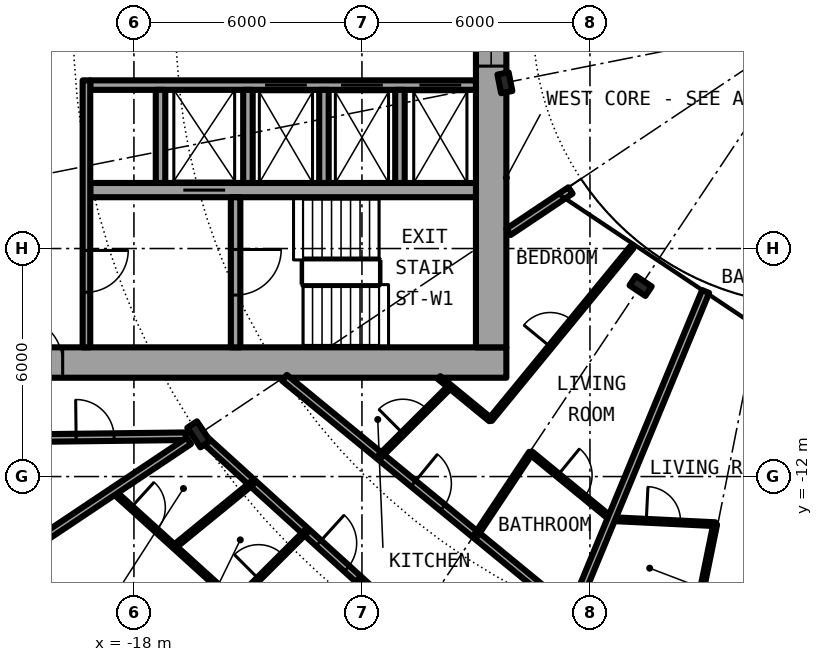
"""IFC4 building model, lengths in metres.
Left out: names, types, materials, properties, quantities, classifications, styles, units other than length and angle.
Written with IfcOpenShell. Run it as: python <this file> out.ifc"""

import sys

from ifc_helpers import new_model, si_unit, direction, frame, frame_2d, origin, origin_2d, place, context, subcontext, project, spatial, rectangle, i_section, extrude, element, fill, save


model = new_model("IFC4")
c1 = context("Model", 3, precision=1e-05, world=origin(), true_north=direction((0.0, 1.0)))
c2 = subcontext(c1, "Body", "Model", "MODEL_VIEW")
j1 = project(units=[si_unit("LENGTHUNIT", "METRE"), si_unit("PLANEANGLEUNIT", "RADIAN")], contexts=[c1])
p1 = place(None, origin())
s1 = spatial("IfcSite", under=j1, at=p1, CompositionType="ELEMENT")
p2 = place(p1, origin())
s2 = spatial("IfcBuilding", under=s1, at=p2, CompositionType="ELEMENT")
p3 = place(p2, frame((0.0, 0.0, 41.1)))
s3 = spatial("IfcBuildingStorey", under=s2, at=p3, CompositionType="ELEMENT", Elevation=41.1)
p4 = place(p3, frame((-16.297, -10.889, 0.0), z_axis=(0.0, 0.0, 1.0), x_axis=(-0.831469612303, -0.55557023302, 0.0)))
e1 = element("IfcColumn", 1, at=p4, inside=s3, PredefinedType="COLUMN", context=c2, shape_type="SweptSolid", body=[
    extrude(i_section(OverallWidth=0.305, OverallDepth=0.62, WebThickness=0.021, FlangeThickness=0.04, FilletRadius=0.027, at=origin_2d()), origin(), (0.0, 0.0, 1.0), 3.05),
])
for number, where, z_axis, x_axis in (
    (2, (-8.239, -1.639, 0.0), (0.0, 0.0, 1.0), (-0.981, -0.195, 0.0)),
    (3, (-4.667, -6.984, 0.0), (0.0, 0.0, 1.0), (-0.556, -0.831, 0.0)),
):
    element("IfcColumn", number, at=place(p3, frame(where, z_axis=z_axis, x_axis=x_axis)), inside=s3, PredefinedType="COLUMN", context=c2, shape_type="SweptSolid", body=[
        extrude(i_section(OverallWidth=0.3, OverallDepth=0.5, WebThickness=0.014, FlangeThickness=0.028, FilletRadius=0.027, at=origin_2d()), origin(), (0.0, 0.0, 1.0), 3.05),
    ])
p5 = place(p3, frame((-22.4, -9.0, 0.0), z_axis=(0.0, 0.0, 1.0), x_axis=(1.0, 0.0, 0.0)))
e4 = element("IfcWall", 4, at=p5, inside=s3, PredefinedType="SHEAR", context=c2, shape_type="SweptSolid", body=[
    extrude(rectangle(XDim=14.2, YDim=0.8, at=frame_2d((7.1, 0.0))), origin(), (0.0, 0.0, 1.0), 3.05),
])
p6 = place(p5, frame((1.325, 0.0, 0.0)))
e5 = element("IfcOpeningElement", 5, at=p6, cuts=e4, PredefinedType="OPENING", context=c2, shape_type="SweptSolid", body=[
    extrude(rectangle(XDim=1.2, YDim=2.3, at=frame_2d((0.6, 1.15))), frame((0.0, 0.41, 0.0), z_axis=(0.0, -1.0, 0.0), x_axis=(1.0, 0.0, 0.0)), (0.0, 0.0, 1.0), 0.82),
])
p7 = place(p3, frame((-8.6, 8.6, 0.0), z_axis=(0.0, 0.0, 1.0), x_axis=(0.0, -1.0, 0.0)))
e6 = element("IfcWall", 6, at=p7, inside=s3, PredefinedType="SHEAR", context=c2, shape_type="SweptSolid", body=[
    extrude(rectangle(XDim=17.2, YDim=0.8, at=frame_2d((8.6, 0.0))), origin(), (0.0, 0.0, 1.0), 3.05),
])
p8 = place(p7, frame((7.4, 0.0, 0.1)))
e7 = element("IfcOpeningElement", 7, at=p8, cuts=e6, PredefinedType="OPENING", context=c2, shape_type="SweptSolid", body=[
    extrude(rectangle(XDim=2.4, YDim=2.2, at=frame_2d((1.2, 1.1))), frame((0.0, 0.41, 0.0), z_axis=(0.0, -1.0, 0.0), x_axis=(1.0, 0.0, 0.0)), (0.0, 0.0, 1.0), 0.82),
])
p9 = place(p3, frame((-9.0, -1.7, 0.0), z_axis=(0.0, 0.0, 1.0), x_axis=(-1.0, 0.0, 0.0)))
e8 = element("IfcWall", 8, at=p9, inside=s3, PredefinedType="SHEAR", context=c2, shape_type="SweptSolid", body=[
    extrude(rectangle(XDim=10.15, YDim=0.25, at=frame_2d((5.075, 0.0))), origin(), (0.0, 0.0, 1.0), 3.05),
])
p10 = place(p9, frame((0.387, 0.0, 0.0)))
e9 = element("IfcOpeningElement", 9, at=p10, cuts=e8, PredefinedType="OPENING", context=c2, shape_type="SweptSolid", body=[
    extrude(rectangle(XDim=1.1, YDim=2.3, at=frame_2d((0.55, 1.15))), frame((0.0, 0.135, 0.0), z_axis=(0.0, -1.0, 0.0), x_axis=(1.0, 0.0, 0.0)), (0.0, 0.0, 1.0), 0.27),
])
p11 = place(p9, frame((2.45, 0.0, 0.0)))
e10 = element("IfcOpeningElement", 10, at=p11, cuts=e8, PredefinedType="OPENING", context=c2, shape_type="SweptSolid", body=[
    extrude(rectangle(XDim=1.1, YDim=2.3, at=frame_2d((0.55, 1.15))), frame((0.0, 0.135, 0.0), z_axis=(0.0, -1.0, 0.0), x_axis=(1.0, 0.0, 0.0)), (0.0, 0.0, 1.0), 0.27),
])
p12 = place(p9, frame((4.45, 0.0, 0.0)))
e11 = element("IfcOpeningElement", 11, at=p12, cuts=e8, PredefinedType="OPENING", context=c2, shape_type="SweptSolid", body=[
    extrude(rectangle(XDim=1.1, YDim=2.3, at=frame_2d((0.55, 1.15))), frame((0.0, 0.135, 0.0), z_axis=(0.0, -1.0, 0.0), x_axis=(1.0, 0.0, 0.0)), (0.0, 0.0, 1.0), 0.27),
])
p13 = place(p3, frame((-9.0, -4.462, 0.0), z_axis=(0.0, 0.0, 1.0), x_axis=(-1.0, 0.0, 0.0)))
e12 = element("IfcWall", 12, at=p13, inside=s3, PredefinedType="SHEAR", context=c2, shape_type="SweptSolid", body=[
    extrude(rectangle(XDim=10.15, YDim=0.375, at=frame_2d((5.075, 0.0))), origin(), (0.0, 0.0, 1.0), 3.05),
])
p14 = place(p13, frame((6.6, 0.0, 0.0)))
e13 = element("IfcOpeningElement", 13, at=p14, cuts=e12, PredefinedType="OPENING", context=c2, shape_type="SweptSolid", body=[
    extrude(rectangle(XDim=1.1, YDim=2.3, at=frame_2d((0.55, 1.15))), frame((0.0, 0.198, 0.0), z_axis=(0.0, -1.0, 0.0), x_axis=(1.0, 0.0, 0.0)), (0.0, 0.0, 1.0), 0.395),
])
p15 = place(p3, frame((-15.325, -4.65, 0.0), z_axis=(0.0, 0.0, 1.0), x_axis=(0.0, -1.0, 0.0)))
e14 = element("IfcWall", 14, at=p15, inside=s3, PredefinedType="SHEAR", context=c2, shape_type="SweptSolid", body=[
    extrude(rectangle(XDim=3.95, YDim=0.25, at=frame_2d((1.975, 0.0))), origin(), (0.0, 0.0, 1.0), 3.05),
])
p16 = place(p15, frame((1.375, 0.0, 0.0)))
e15 = element("IfcOpeningElement", 15, at=p16, cuts=e14, PredefinedType="OPENING", context=c2, shape_type="SweptSolid", body=[
    extrude(rectangle(XDim=1.2, YDim=2.3, at=frame_2d((0.6, 1.15))), frame((0.0, 0.135, 0.0), z_axis=(0.0, -1.0, 0.0), x_axis=(1.0, 0.0, 0.0)), (0.0, 0.0, 1.0), 0.27),
])
for number, where, z_axis, x_axis in (
    (16, (-15.0, -1.825, 0.0), (0.0, 0.0, 1.0), (0.0, -1.0, 0.0)),
    (17, (-17.3, -1.825, 0.0), (0.0, 0.0, 1.0), (0.0, -1.0, 0.0)),
):
    element("IfcWall", number, at=place(p3, frame(where, z_axis=z_axis, x_axis=x_axis)), inside=s3, PredefinedType="SOLIDWALL", context=c2, shape_type="SweptSolid", body=[
        extrude(rectangle(XDim=2.45, YDim=0.25, at=frame_2d((1.225, 0.0))), origin(), (0.0, 0.0, 1.0), 2.7),
    ])
p17 = place(p3, frame((-19.25, -1.575, 0.0), z_axis=(0.0, 0.0, 1.0), x_axis=(0.0, -1.0, 0.0)))
e18 = element("IfcWall", 18, at=p17, inside=s3, PredefinedType="SOLIDWALL", context=c2, shape_type="SweptSolid", body=[
    extrude(rectangle(XDim=7.025, YDim=0.2, at=frame_2d((3.513, 0.0))), origin(), (0.0, 0.0, 1.0), 2.7),
])
p18 = place(p17, frame((4.475, 0.0, 0.0)))
e19 = element("IfcOpeningElement", 19, at=p18, cuts=e18, PredefinedType="OPENING", context=c2, shape_type="SweptSolid", body=[
    extrude(rectangle(XDim=1.1, YDim=2.3, at=frame_2d((0.55, 1.15))), frame((0.0, 0.11, 0.0), z_axis=(0.0, -1.0, 0.0), x_axis=(1.0, 0.0, 0.0)), (0.0, 0.0, 1.0), 0.22),
])
for number, where, z_axis, x_axis in (
    (20, (-11.0, -1.825, 0.0), (0.0, 0.0, 1.0), (0.0, -1.0, 0.0)),
    (21, (-13.0, -1.825, 0.0), (0.0, 0.0, 1.0), (0.0, -1.0, 0.0)),
):
    element("IfcWall", number, at=place(p3, frame(where, z_axis=z_axis, x_axis=x_axis)), inside=s3, PredefinedType="SOLIDWALL", context=c2, shape_type="SweptSolid", body=[
        extrude(rectangle(XDim=2.45, YDim=0.25, at=frame_2d((1.225, 0.0))), origin(), (0.0, 0.0, 1.0), 2.7),
    ])
p19 = place(p3, frame((-18.545, -12.387, 0.0), z_axis=(0.0, 0.0, 1.0), x_axis=(0.740948416939, -0.671561943112, 0.0)))
e22 = element("IfcWall", 22, at=p19, inside=s3, PredefinedType="PARTITIONING", context=c2, shape_type="SweptSolid", body=[
    extrude(rectangle(XDim=4.335, YDim=0.1, at=frame_2d((2.167, 0.0))), origin(), (0.0, 0.0, 1.0), 2.7),
])
p20 = place(p19, frame((0.636, 0.0, 0.0)))
e23 = element("IfcOpeningElement", 23, at=p20, cuts=e22, PredefinedType="OPENING", context=c2, shape_type="SweptSolid", body=[
    extrude(rectangle(XDim=0.9, YDim=2.3, at=frame_2d((0.45, 1.15))), frame((0.0, 0.06, 0.0), z_axis=(0.0, -1.0, 0.0), x_axis=(1.0, 0.0, 0.0)), (0.0, 0.0, 1.0), 0.12),
])
p21 = place(p3, frame((-16.179, -10.994, 0.0), z_axis=(0.0, 0.0, 1.0), x_axis=(0.740659568799, -0.671880497668, 0.0)))
e24 = element("IfcWall", 24, at=p21, inside=s3, PredefinedType="PARTITIONING", context=c2, shape_type="SweptSolid", body=[
    extrude(rectangle(XDim=9.36, YDim=0.2, at=frame_2d((4.68, 0.0))), origin(), (0.0, 0.0, 1.0), 2.38),
])
p22 = place(p21, frame((4.105, 0.0, 0.0)))
e25 = element("IfcOpeningElement", 25, at=p22, cuts=e24, PredefinedType="OPENING", context=c2, shape_type="SweptSolid", body=[
    extrude(rectangle(XDim=1.0, YDim=2.3, at=frame_2d((0.5, 1.15))), frame((0.0, 0.11, 0.0), z_axis=(0.0, -1.0, 0.0), x_axis=(1.0, 0.0, 0.0)), (0.0, 0.0, 1.0), 0.22),
])
p23 = place(p3, frame((-14.038, -9.402, 0.0), z_axis=(0.0, 0.0, 1.0), x_axis=(0.773084654695, -0.634302858794, 0.0)))
e26 = element("IfcWall", 26, at=p23, inside=s3, PredefinedType="PARTITIONING", context=c2, shape_type="SweptSolid", body=[
    extrude(rectangle(XDim=9.793, YDim=0.2, at=frame_2d((4.896, 0.0))), origin(), (0.0, 0.0, 1.0), 2.7),
])
p24 = place(p23, frame((4.387, 0.0, 0.0)))
e27 = element("IfcOpeningElement", 27, at=p24, cuts=e26, PredefinedType="OPENING", context=c2, shape_type="SweptSolid", body=[
    extrude(rectangle(XDim=1.0, YDim=2.3, at=frame_2d((0.5, 1.15))), frame((0.0, 0.11, 0.0), z_axis=(0.0, -1.0, 0.0), x_axis=(1.0, 0.0, 0.0)), (0.0, 0.0, 1.0), 0.22),
])
p25 = place(p3, frame((-9.971, -9.396, 0.0), z_axis=(0.0, 0.0, 1.0), x_axis=(0.77321028337, -0.634149712363, 0.0)))
e28 = element("IfcWall", 28, at=p25, inside=s3, PredefinedType="PARTITIONING", context=c2, shape_type="SweptSolid", body=[
    extrude(rectangle(XDim=1.749, YDim=0.1, at=frame_2d((0.874, 0.0))), origin(), (0.0, 0.0, 1.0), 2.7),
])
p26 = place(p3, frame((-7.558, -11.376, 0.0), z_axis=(0.0, 0.0, 1.0), x_axis=(0.773049907698, -0.634345205868, 0.0)))
e29 = element("IfcWall", 29, at=p26, inside=s3, PredefinedType="PARTITIONING", context=c2, shape_type="SweptSolid", body=[
    extrude(rectangle(XDim=2.748, YDim=0.1, at=frame_2d((1.374, 0.0))), origin(), (0.0, 0.0, 1.0), 2.7),
])
p27 = place(p26, frame((0.924, 0.0, 0.0)))
e30 = element("IfcOpeningElement", 30, at=p27, cuts=e29, PredefinedType="OPENING", context=c2, shape_type="SweptSolid", body=[
    extrude(rectangle(XDim=0.9, YDim=2.3, at=frame_2d((0.45, 1.15))), frame((0.0, 0.06, 0.0), z_axis=(0.0, -1.0, 0.0), x_axis=(1.0, 0.0, 0.0)), (0.0, 0.0, 1.0), 0.12),
])
p28 = place(p3, frame((-5.434, -13.119, 0.0), z_axis=(0.0, 0.0, 1.0), x_axis=(0.998796928508, -0.049037695739, 0.0)))
e31 = element("IfcWall", 31, at=p28, inside=s3, PredefinedType="PARTITIONING", context=c2, shape_type="SweptSolid", body=[
    extrude(rectangle(XDim=2.733, YDim=0.1, at=frame_2d((1.367, 0.0))), origin(), (0.0, 0.0, 1.0), 2.7),
])
p29 = place(p28, frame((0.917, 0.0, 0.0)))
e32 = element("IfcOpeningElement", 32, at=p29, cuts=e31, PredefinedType="OPENING", context=c2, shape_type="SweptSolid", body=[
    extrude(rectangle(XDim=0.9, YDim=2.3, at=frame_2d((0.45, 1.15))), frame((0.0, 0.06, 0.0), z_axis=(0.0, -1.0, 0.0), x_axis=(1.0, 0.0, 0.0)), (0.0, 0.0, 1.0), 0.12),
])
p30 = place(p3, frame((-21.675, -11.0, 0.0), z_axis=(0.0, 0.0, 1.0), x_axis=(0.999926652916, 0.012111514691, 0.0)))
e33 = element("IfcWall", 33, at=p30, inside=s3, PredefinedType="PARTITIONING", context=c2, shape_type="SweptSolid", body=[
    extrude(rectangle(XDim=5.04, YDim=0.2, at=frame_2d((2.52, 0.0))), origin(), (0.0, 0.0, 1.0), 2.7),
])
p31 = place(p30, frame((2.154, 0.0, 0.0)))
e34 = element("IfcOpeningElement", 34, at=p31, cuts=e33, PredefinedType="OPENING", context=c2, shape_type="SweptSolid", body=[
    extrude(rectangle(XDim=1.0, YDim=2.3, at=frame_2d((0.5, 1.15))), frame((0.0, 0.11, 0.0), z_axis=(0.0, -1.0, 0.0), x_axis=(1.0, 0.0, 0.0)), (0.0, 0.0, 1.0), 0.22),
])
p32 = place(p3, frame((-6.513, -4.472, 0.0), z_axis=(0.0, 0.0, 1.0), x_axis=(-0.831417956244, -0.555647533996, 0.0)))
e35 = element("IfcWall", 35, at=p32, inside=s3, PredefinedType="PARTITIONING", context=c2, shape_type="SweptSolid", body=[
    extrude(rectangle(XDim=1.962, YDim=0.2, at=frame_2d((0.981, 0.0))), origin(), (0.0, 0.0, 1.0), 2.7),
])
p33 = place(p3, frame((-22.595, -15.097, 0.0), z_axis=(0.0, 0.0, 1.0), x_axis=(0.831465568067, 0.555576285599, 0.0)))
e36 = element("IfcWall", 36, at=p33, inside=s3, PredefinedType="PARTITIONING", context=c2, shape_type="SweptSolid", body=[
    extrude(rectangle(XDim=7.264, YDim=0.2, at=frame_2d((3.632, 0.0))), origin(), (0.0, 0.0, 1.0), 2.7),
])
p34 = place(p3, frame((-17.22, -21.022, 0.0), z_axis=(0.0, 0.0, 1.0), x_axis=(0.633794691983, 0.773501317655, 0.0)))
e37 = element("IfcWall", 37, at=p34, inside=s3, PredefinedType="PARTITIONING", context=c2, shape_type="SweptSolid", body=[
    extrude(rectangle(XDim=8.138, YDim=0.1, at=frame_2d((4.069, 0.0))), origin(), (0.0, 0.0, 1.0), 2.7),
])
p35 = place(p34, frame((6.377, 0.0, 0.0)))
e38 = element("IfcOpeningElement", 38, at=p35, cuts=e37, PredefinedType="OPENING", context=c2, shape_type="SweptSolid", body=[
    extrude(rectangle(XDim=0.9, YDim=2.3, at=frame_2d((0.45, 1.15))), frame((0.0, 0.06, 0.0), z_axis=(0.0, -1.0, 0.0), x_axis=(1.0, 0.0, 0.0)), (0.0, 0.0, 1.0), 0.12),
])
p36 = place(p34, frame((2.306, 0.0, 0.0)))
e39 = element("IfcOpeningElement", 39, at=p36, cuts=e37, PredefinedType="OPENING", context=c2, shape_type="SweptSolid", body=[
    extrude(rectangle(XDim=0.9, YDim=2.3, at=frame_2d((0.45, 1.15))), frame((0.0, 0.06, 0.0), z_axis=(0.0, -1.0, 0.0), x_axis=(1.0, 0.0, 0.0)), (0.0, 0.0, 1.0), 0.12),
])
p37 = place(p3, frame((-16.936, -13.845, 0.0), z_axis=(0.0, 0.0, 1.0), x_axis=(0.774162545943, 0.632986850147, 0.0)))
e40 = element("IfcWall", 40, at=p37, inside=s3, PredefinedType="PARTITIONING", context=c2, shape_type="SweptSolid", body=[
    extrude(rectangle(XDim=2.649, YDim=0.1, at=frame_2d((1.325, 0.0))), origin(), (0.0, 0.0, 1.0), 2.7),
])
p38 = place(p3, frame((-15.33, -15.3, 0.0), z_axis=(0.0, 0.0, 1.0), x_axis=(0.707851299421, 0.706361478217, 0.0)))
e41 = element("IfcWall", 41, at=p38, inside=s3, PredefinedType="PARTITIONING", context=c2, shape_type="SweptSolid", body=[
    extrude(rectangle(XDim=2.622, YDim=0.1, at=frame_2d((1.311, 0.0))), origin(), (0.0, 0.0, 1.0), 2.7),
])
p39 = place(p38, frame((0.861, 0.0, 0.0)))
e42 = element("IfcOpeningElement", 42, at=p39, cuts=e41, PredefinedType="OPENING", context=c2, shape_type="SweptSolid", body=[
    extrude(rectangle(XDim=0.9, YDim=2.3, at=frame_2d((0.45, 1.15))), frame((0.0, 0.06, 0.0), z_axis=(0.0, -1.0, 0.0), x_axis=(1.0, 0.0, 0.0)), (0.0, 0.0, 1.0), 0.12),
])
p40 = place(p3, frame((-11.524, -11.464, 0.0), z_axis=(0.0, 0.0, 1.0), x_axis=(0.708796844581, 0.705412668665, 0.0)))
e43 = element("IfcWall", 43, at=p40, inside=s3, PredefinedType="PARTITIONING", context=c2, shape_type="SweptSolid", body=[
    extrude(rectangle(XDim=2.597, YDim=0.1, at=frame_2d((1.299, 0.0))), origin(), (0.0, 0.0, 1.0), 2.7),
])
p41 = place(p40, frame((0.849, 0.0, 0.0)))
e44 = element("IfcOpeningElement", 44, at=p41, cuts=e43, PredefinedType="OPENING", context=c2, shape_type="SweptSolid", body=[
    extrude(rectangle(XDim=0.9, YDim=2.3, at=frame_2d((0.45, 1.15))), frame((0.0, 0.06, 0.0), z_axis=(0.0, -1.0, 0.0), x_axis=(1.0, 0.0, 0.0)), (0.0, 0.0, 1.0), 0.12),
])
p42 = place(p3, frame((-8.996, -13.539, 0.0), z_axis=(0.0, 0.0, 1.0), x_axis=(0.553615197403, 0.83277260594, 0.0)))
e45 = element("IfcWall", 45, at=p42, inside=s3, PredefinedType="PARTITIONING", context=c2, shape_type="SweptSolid", body=[
    extrude(rectangle(XDim=2.597, YDim=0.1, at=frame_2d((1.299, 0.0))), origin(), (0.0, 0.0, 1.0), 2.7),
])
p43 = place(p3, frame((-8.62, -10.504, 0.0), z_axis=(0.0, 0.0, 1.0), x_axis=(0.634358693064, 0.773038840249, 0.0)))
e46 = element("IfcWall", 46, at=p43, inside=s3, PredefinedType="PARTITIONING", context=c2, shape_type="SweptSolid", body=[
    extrude(rectangle(XDim=5.868, YDim=0.1, at=frame_2d((2.934, 0.0))), origin(), (0.0, 0.0, 1.0), 2.7),
])
p44 = place(p43, frame((2.484, 0.0, 0.0)))
e47 = element("IfcOpeningElement", 47, at=p44, cuts=e46, PredefinedType="OPENING", context=c2, shape_type="SweptSolid", body=[
    extrude(rectangle(XDim=0.9, YDim=2.3, at=frame_2d((0.45, 1.15))), frame((0.0, 0.06, 0.0), z_axis=(0.0, -1.0, 0.0), x_axis=(1.0, 0.0, 0.0)), (0.0, 0.0, 1.0), 0.12),
])
p45 = place(p3, frame((-6.472, -15.612, 0.0), z_axis=(0.0, 0.0, 1.0), x_axis=(0.382956910161, 0.923766206873, 0.0)))
e48 = element("IfcWall", 48, at=p45, inside=s3, PredefinedType="PARTITIONING", context=c2, shape_type="SweptSolid", body=[
    extrude(rectangle(XDim=9.181, YDim=0.2, at=frame_2d((4.59, 0.0))), origin(), (0.0, 0.0, 1.0), 2.7),
])
p46 = place(p3, frame((-3.218, -15.773, 0.0), z_axis=(0.0, 0.0, 1.0), x_axis=(0.199820523641, 0.979832515449, 0.0)))
e49 = element("IfcWall", 49, at=p46, inside=s3, PredefinedType="PARTITIONING", context=c2, shape_type="SweptSolid", body=[
    extrude(rectangle(XDim=2.572, YDim=0.1, at=frame_2d((1.286, 0.0))), origin(), (0.0, 0.0, 1.0), 2.7),
])
p47 = place(p10, origin())
e50 = element("IfcDoor", 50, at=p47, inside=s3, OperationType="DOUBLE_DOOR_SLIDING", PredefinedType="DOOR", context=c2, shape_type="SweptSolid", body=[
    extrude(rectangle(XDim=1.1, YDim=2.3, at=frame_2d((0.55, 1.15))), frame((0.0, 0.025, 0.0), z_axis=(0.0, -1.0, 0.0), x_axis=(1.0, 0.0, 0.0)), (0.0, 0.0, 1.0), 0.05),
])
fill(e9, e50)
p48 = place(p11, origin())
e51 = element("IfcDoor", 51, at=p48, inside=s3, OperationType="DOUBLE_DOOR_SLIDING", PredefinedType="DOOR", context=c2, shape_type="SweptSolid", body=[
    extrude(rectangle(XDim=1.1, YDim=2.3, at=frame_2d((0.55, 1.15))), frame((0.0, 0.025, 0.0), z_axis=(0.0, -1.0, 0.0), x_axis=(1.0, 0.0, 0.0)), (0.0, 0.0, 1.0), 0.05),
])
fill(e10, e51)
p49 = place(p12, origin())
e52 = element("IfcDoor", 52, at=p49, inside=s3, OperationType="DOUBLE_DOOR_SLIDING", PredefinedType="DOOR", context=c2, shape_type="SweptSolid", body=[
    extrude(rectangle(XDim=1.1, YDim=2.3, at=frame_2d((0.55, 1.15))), frame((0.0, 0.025, 0.0), z_axis=(0.0, -1.0, 0.0), x_axis=(1.0, 0.0, 0.0)), (0.0, 0.0, 1.0), 0.05),
])
fill(e11, e52)
p50 = place(p14, origin())
e53 = element("IfcDoor", 53, at=p50, inside=s3, OperationType="DOUBLE_DOOR_SLIDING", PredefinedType="DOOR", context=c2, shape_type="SweptSolid", body=[
    extrude(rectangle(XDim=1.1, YDim=2.3, at=frame_2d((0.55, 1.15))), frame((0.0, 0.025, 0.0), z_axis=(0.0, -1.0, 0.0), x_axis=(1.0, 0.0, 0.0)), (0.0, 0.0, 1.0), 0.05),
])
fill(e13, e53)
p51 = place(p16, origin())
e54 = element("IfcDoor", 54, at=p51, inside=s3, OperationType="SINGLE_SWING_LEFT", PredefinedType="DOOR", context=c2, shape_type="SweptSolid", body=[
    extrude(rectangle(XDim=1.2, YDim=2.3, at=frame_2d((0.6, 1.15))), frame((0.0, 0.025, 0.0), z_axis=(0.0, -1.0, 0.0), x_axis=(1.0, 0.0, 0.0)), (0.0, 0.0, 1.0), 0.05),
])
fill(e15, e54)
p52 = place(p18, origin())
e55 = element("IfcDoor", 55, at=p52, inside=s3, OperationType="SINGLE_SWING_LEFT", PredefinedType="DOOR", context=c2, shape_type="SweptSolid", body=[
    extrude(rectangle(XDim=1.1, YDim=2.3, at=frame_2d((0.55, 1.15))), frame((0.0, 0.025, 0.0), z_axis=(0.0, -1.0, 0.0), x_axis=(1.0, 0.0, 0.0)), (0.0, 0.0, 1.0), 0.05),
])
fill(e19, e55)
p53 = place(p6, origin())
e56 = element("IfcDoor", 56, at=p53, inside=s3, OperationType="SINGLE_SWING_RIGHT", PredefinedType="DOOR", context=c2, shape_type="SweptSolid", body=[
    extrude(rectangle(XDim=1.2, YDim=2.3, at=frame_2d((0.6, 1.15))), frame((0.0, 0.025, 0.0), z_axis=(0.0, -1.0, 0.0), x_axis=(1.0, 0.0, 0.0)), (0.0, 0.0, 1.0), 0.05),
])
fill(e5, e56)
p54 = place(p8, origin())
e57 = element("IfcWindow", 57, at=p54, inside=s3, PartitioningType="SINGLE_PANEL", PredefinedType="WINDOW", context=c2, shape_type="SweptSolid", body=[
    extrude(rectangle(XDim=2.4, YDim=2.2, at=frame_2d((1.2, 1.1))), frame((0.0, 0.03, 0.0), z_axis=(0.0, -1.0, 0.0), x_axis=(1.0, 0.0, 0.0)), (0.0, 0.0, 1.0), 0.06),
])
fill(e7, e57)
p55 = place(p22, origin())
e58 = element("IfcDoor", 58, at=p55, inside=s3, OperationType="SINGLE_SWING_LEFT", PredefinedType="DOOR", context=c2, shape_type="SweptSolid", body=[
    extrude(rectangle(XDim=1.0, YDim=2.3, at=frame_2d((0.5, 1.15))), frame((0.0, 0.025, 0.0), z_axis=(0.0, -1.0, 0.0), x_axis=(1.0, 0.0, 0.0)), (0.0, 0.0, 1.0), 0.05),
])
fill(e25, e58)
p56 = place(p20, origin())
e59 = element("IfcDoor", 59, at=p56, inside=s3, OperationType="SINGLE_SWING_LEFT", PredefinedType="DOOR", context=c2, shape_type="SweptSolid", body=[
    extrude(rectangle(XDim=0.9, YDim=2.3, at=frame_2d((0.45, 1.15))), frame((0.0, 0.025, 0.0), z_axis=(0.0, -1.0, 0.0), x_axis=(1.0, 0.0, 0.0)), (0.0, 0.0, 1.0), 0.05),
])
fill(e23, e59)
p57 = place(p39, origin())
e60 = element("IfcDoor", 60, at=p57, inside=s3, OperationType="SINGLE_SWING_RIGHT", PredefinedType="DOOR", context=c2, shape_type="SweptSolid", body=[
    extrude(rectangle(XDim=0.9, YDim=2.3, at=frame_2d((0.45, 1.15))), frame((0.0, 0.025, 0.0), z_axis=(0.0, -1.0, 0.0), x_axis=(1.0, 0.0, 0.0)), (0.0, 0.0, 1.0), 0.05),
])
fill(e42, e60)
p58 = place(p24, origin())
e61 = element("IfcDoor", 61, at=p58, inside=s3, OperationType="SINGLE_SWING_LEFT", PredefinedType="DOOR", context=c2, shape_type="SweptSolid", body=[
    extrude(rectangle(XDim=1.0, YDim=2.3, at=frame_2d((0.5, 1.15))), frame((0.0, 0.025, 0.0), z_axis=(0.0, -1.0, 0.0), x_axis=(1.0, 0.0, 0.0)), (0.0, 0.0, 1.0), 0.05),
])
fill(e27, e61)
p59 = place(p27, origin())
e62 = element("IfcDoor", 62, at=p59, inside=s3, OperationType="SINGLE_SWING_LEFT", PredefinedType="DOOR", context=c2, shape_type="SweptSolid", body=[
    extrude(rectangle(XDim=0.9, YDim=2.3, at=frame_2d((0.45, 1.15))), frame((0.0, 0.025, 0.0), z_axis=(0.0, -1.0, 0.0), x_axis=(1.0, 0.0, 0.0)), (0.0, 0.0, 1.0), 0.05),
])
fill(e30, e62)
p60 = place(p41, origin())
e63 = element("IfcDoor", 63, at=p60, inside=s3, OperationType="SINGLE_SWING_RIGHT", PredefinedType="DOOR", context=c2, shape_type="SweptSolid", body=[
    extrude(rectangle(XDim=0.9, YDim=2.3, at=frame_2d((0.45, 1.15))), frame((0.0, 0.025, 0.0), z_axis=(0.0, -1.0, 0.0), x_axis=(1.0, 0.0, 0.0)), (0.0, 0.0, 1.0), 0.05),
])
fill(e44, e63)
p61 = place(p44, origin())
e64 = element("IfcDoor", 64, at=p61, inside=s3, OperationType="SINGLE_SWING_RIGHT", PredefinedType="DOOR", context=c2, shape_type="SweptSolid", body=[
    extrude(rectangle(XDim=0.9, YDim=2.3, at=frame_2d((0.45, 1.15))), frame((0.0, 0.025, 0.0), z_axis=(0.0, -1.0, 0.0), x_axis=(1.0, 0.0, 0.0)), (0.0, 0.0, 1.0), 0.05),
])
fill(e47, e64)
p62 = place(p29, origin())
e65 = element("IfcDoor", 65, at=p62, inside=s3, OperationType="SINGLE_SWING_LEFT", PredefinedType="DOOR", context=c2, shape_type="SweptSolid", body=[
    extrude(rectangle(XDim=0.9, YDim=2.3, at=frame_2d((0.45, 1.15))), frame((0.0, 0.025, 0.0), z_axis=(0.0, -1.0, 0.0), x_axis=(1.0, 0.0, 0.0)), (0.0, 0.0, 1.0), 0.05),
])
fill(e32, e65)
p63 = place(p31, origin())
e66 = element("IfcDoor", 66, at=p63, inside=s3, OperationType="SINGLE_SWING_RIGHT", PredefinedType="DOOR", context=c2, shape_type="SweptSolid", body=[
    extrude(rectangle(XDim=1.0, YDim=2.3, at=frame_2d((0.5, 1.15))), frame((0.0, 0.025, 0.0), z_axis=(0.0, -1.0, 0.0), x_axis=(1.0, 0.0, 0.0)), (0.0, 0.0, 1.0), 0.05),
])
fill(e34, e66)
save(model, sys.argv[1])
